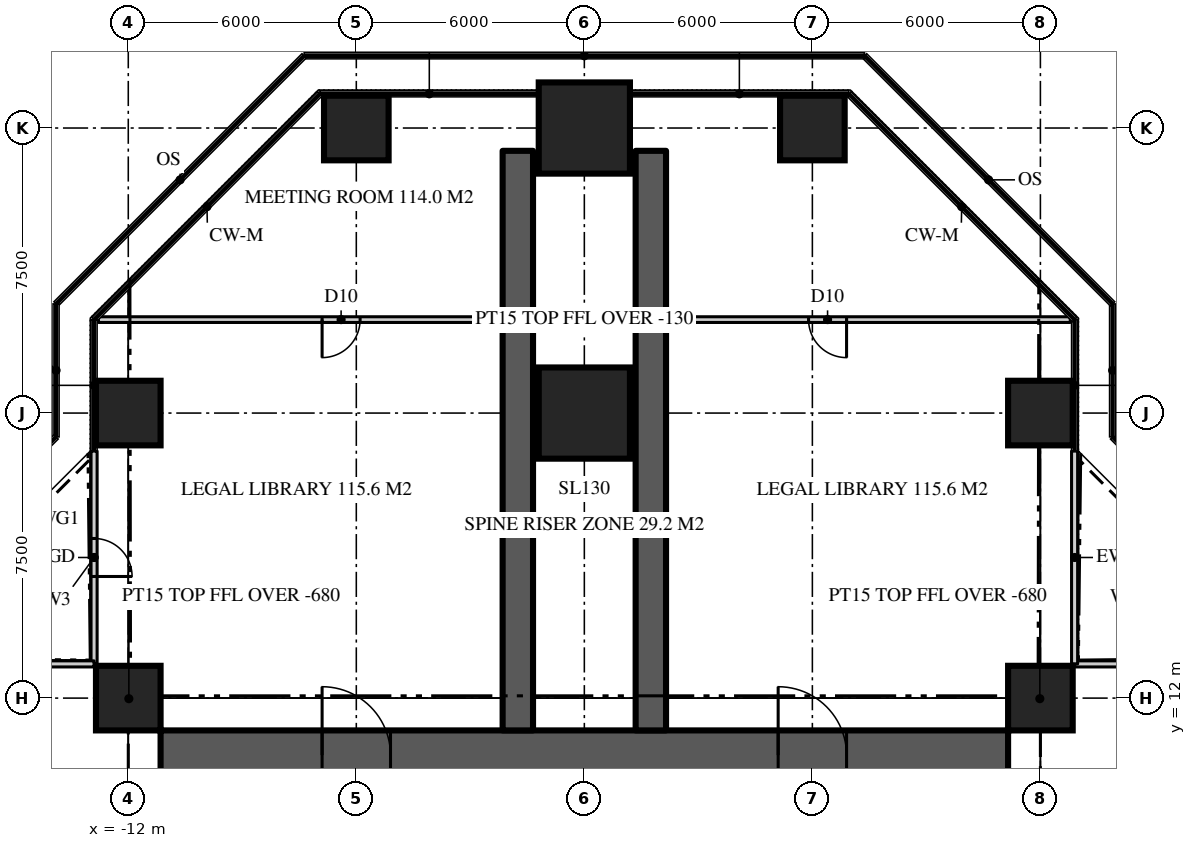
"""IFC4 building model, lengths in metres.
Left out: names, types, materials, properties, quantities, classifications, styles, units other than length and angle.
Written with IfcOpenShell. Run it as: python <this file> out.ifc"""

import sys

from ifc_helpers import new_model, si_unit, direction, frame, frame_2d, origin, origin_2d, place, context, subcontext, project, spatial, rectangle, extrude, element, fill, save


model = new_model("IFC4")
c1 = context("Model", 3, precision=1e-05, world=origin(), true_north=direction((0.0, 1.0)))
c2 = subcontext(c1, "Body", "Model", "MODEL_VIEW")
j1 = project(units=[si_unit("LENGTHUNIT", "METRE"), si_unit("PLANEANGLEUNIT", "RADIAN")], contexts=[c1])
p1 = place(None, origin())
s1 = spatial("IfcSite", under=j1, at=p1, CompositionType="ELEMENT")
p2 = place(p1, origin())
s2 = spatial("IfcBuilding", under=s1, at=p2, CompositionType="ELEMENT")
p3 = place(p2, frame((0.0, 0.0, 143.7)))
s3 = spatial("IfcBuildingStorey", under=s2, at=p3, CompositionType="ELEMENT", Elevation=143.7)
p4 = place(p3, frame((-11.15, 10.5, 0.0), z_axis=(0.0, 0.0, 1.0), x_axis=(1.0, 0.0, 0.0)))
e1 = element("IfcWall", 1, at=p4, inside=s3, PredefinedType="SHEAR", context=c2, shape_type="SweptSolid", body=[
    extrude(rectangle(XDim=22.3, YDim=1.3, at=frame_2d((11.15, 0.0))), origin(), (0.0, 0.0, 1.0), 3.9),
])
p5 = place(p4, frame((4.25, 0.0, 0.0)))
e2 = element("IfcOpeningElement", 2, at=p5, cuts=e1, PredefinedType="OPENING", context=c2, shape_type="SweptSolid", body=[
    extrude(rectangle(XDim=1.8, YDim=2.2, at=frame_2d((0.9, 1.1))), frame((0.0, 0.66, 0.0), z_axis=(0.0, -1.0, 0.0), x_axis=(1.0, 0.0, 0.0)), (0.0, 0.0, 1.0), 1.32),
])
p6 = place(p4, frame((16.25, 0.0, 0.0)))
e3 = element("IfcOpeningElement", 3, at=p6, cuts=e1, PredefinedType="OPENING", context=c2, shape_type="SweptSolid", body=[
    extrude(rectangle(XDim=1.8, YDim=2.2, at=frame_2d((0.9, 1.1))), frame((0.0, 0.66, 0.0), z_axis=(0.0, -1.0, 0.0), x_axis=(1.0, 0.0, 0.0)), (0.0, 0.0, 1.0), 1.32),
])
for number, where, z_axis, x_axis in (
    (4, (1.75, 11.15, 0.0), (0.0, 0.0, 1.0), (0.0, 1.0, 0.0)),
    (5, (-1.75, 11.15, 0.0), (0.0, 0.0, 1.0), (0.0, 1.0, 0.0)),
):
    element("IfcWall", number, at=place(p3, frame(where, z_axis=z_axis, x_axis=x_axis)), inside=s3, PredefinedType="SHEAR", context=c2, shape_type="SweptSolid", body=[
        extrude(rectangle(XDim=15.25, YDim=0.8, at=frame_2d((7.625, 0.0))), origin(), (0.0, 0.0, 1.0), 3.9),
    ])
for number, where, z_axis, x_axis in (
    (6, (-12.0, 12.0, 0.0), (0.0, 0.0, 1.0), (1.0, 0.0, 0.0)),
    (7, (12.0, 12.0, 0.0), (0.0, 0.0, 1.0), (1.0, 0.0, 0.0)),
    (8, (-12.0, 19.5, 0.0), (0.0, 0.0, 1.0), (1.0, 0.0, 0.0)),
):
    element("IfcColumn", number, at=place(p3, frame(where, z_axis=z_axis, x_axis=x_axis)), inside=s3, PredefinedType="COLUMN", context=c2, shape_type="SweptSolid", body=[
        extrude(rectangle(XDim=1.7, YDim=1.7, at=origin_2d()), origin(), (0.0, 0.0, 1.0), 3.9),
    ])
p7 = place(p3, frame((0.0, 19.5, 0.0), z_axis=(0.0, 0.0, 1.0), x_axis=(1.0, 0.0, 0.0)))
e9 = element("IfcColumn", 9, at=p7, inside=s3, PredefinedType="COLUMN", context=c2, shape_type="SweptSolid", body=[
    extrude(rectangle(XDim=2.4, YDim=2.4, at=origin_2d()), origin(), (0.0, 0.0, 1.0), 3.9),
])
for number, where, z_axis, x_axis in (
    (10, (12.0, 19.5, 0.0), (0.0, 0.0, 1.0), (1.0, 0.0, 0.0)),
    (11, (-6.0, 27.0, 0.0), (0.0, 0.0, 1.0), (1.0, 0.0, 0.0)),
):
    element("IfcColumn", number, at=place(p3, frame(where, z_axis=z_axis, x_axis=x_axis)), inside=s3, PredefinedType="COLUMN", context=c2, shape_type="SweptSolid", body=[
        extrude(rectangle(XDim=1.7, YDim=1.7, at=origin_2d()), origin(), (0.0, 0.0, 1.0), 3.9),
    ])
p8 = place(p3, frame((0.0, 27.0, 0.0), z_axis=(0.0, 0.0, 1.0), x_axis=(1.0, 0.0, 0.0)))
e12 = element("IfcColumn", 12, at=p8, inside=s3, PredefinedType="COLUMN", context=c2, shape_type="SweptSolid", body=[
    extrude(rectangle(XDim=2.4, YDim=2.4, at=origin_2d()), origin(), (0.0, 0.0, 1.0), 3.9),
])
p9 = place(p3, frame((6.0, 27.0, 0.0), z_axis=(0.0, 0.0, 1.0), x_axis=(1.0, 0.0, 0.0)))
e13 = element("IfcColumn", 13, at=p9, inside=s3, PredefinedType="COLUMN", context=c2, shape_type="SweptSolid", body=[
    extrude(rectangle(XDim=1.7, YDim=1.7, at=origin_2d()), origin(), (0.0, 0.0, 1.0), 3.9),
])
p10 = place(p3, frame((18.5, 12.9, 0.0), z_axis=(0.0, 0.0, 1.0), x_axis=(-1.0, 0.0, 0.0)))
e14 = element("IfcWall", 14, at=p10, inside=s3, PredefinedType="SOLIDWALL", context=c2, shape_type="SweptSolid", body=[
    extrude(rectangle(XDim=5.6, YDim=0.16, at=frame_2d((2.8, 0.0))), origin(), (0.0, 0.0, 1.0), 3.77),
])
p11 = place(p10, frame((2.3, 0.0, 0.0)))
e15 = element("IfcOpeningElement", 15, at=p11, cuts=e14, PredefinedType="OPENING", context=c2, shape_type="SweptSolid", body=[
    extrude(rectangle(XDim=1.0, YDim=2.2, at=frame_2d((0.5, 1.1))), frame((0.0, 0.09, 0.0), z_axis=(0.0, -1.0, 0.0), x_axis=(1.0, 0.0, 0.0)), (0.0, 0.0, 1.0), 0.18),
])
p12 = place(p3, frame((12.9, 12.9, 0.0), z_axis=(0.0, 0.0, 1.0), x_axis=(0.0, 1.0, 0.0)))
e16 = element("IfcWall", 16, at=p12, inside=s3, PredefinedType="SOLIDWALL", context=c2, shape_type="SweptSolid", body=[
    extrude(rectangle(XDim=5.6, YDim=0.16, at=frame_2d((2.8, 0.0))), origin(), (0.0, 0.0, 1.0), 3.77),
])
p13 = place(p3, frame((-12.9, 18.5, 0.0), z_axis=(0.0, 0.0, 1.0), x_axis=(0.0, -1.0, 0.0)))
e17 = element("IfcWall", 17, at=p13, inside=s3, PredefinedType="SOLIDWALL", context=c2, shape_type="SweptSolid", body=[
    extrude(rectangle(XDim=5.6, YDim=0.16, at=frame_2d((2.8, 0.0))), origin(), (0.0, 0.0, 1.0), 3.77),
])
p14 = place(p13, frame((2.3, 0.0, 0.0)))
e18 = element("IfcOpeningElement", 18, at=p14, cuts=e17, PredefinedType="OPENING", context=c2, shape_type="SweptSolid", body=[
    extrude(rectangle(XDim=1.0, YDim=2.2, at=frame_2d((0.5, 1.1))), frame((0.0, 0.09, 0.0), z_axis=(0.0, -1.0, 0.0), x_axis=(1.0, 0.0, 0.0)), (0.0, 0.0, 1.0), 0.18),
])
p15 = place(p3, frame((-12.9, 12.9, 0.0), z_axis=(0.0, 0.0, 1.0), x_axis=(-1.0, 0.0, 0.0)))
e19 = element("IfcWall", 19, at=p15, inside=s3, PredefinedType="SOLIDWALL", context=c2, shape_type="SweptSolid", body=[
    extrude(rectangle(XDim=5.6, YDim=0.16, at=frame_2d((2.8, 0.0))), origin(), (0.0, 0.0, 1.0), 3.77),
])
p16 = place(p3, frame((12.786, 21.959, 0.0), z_axis=(0.0, 0.0, 1.0), x_axis=(-1.0, 0.0, 0.0)))
e20 = element("IfcWall", 20, at=p16, inside=s3, PredefinedType="PARTITIONING", context=c2, shape_type="SweptSolid", body=[
    extrude(rectangle(XDim=25.573, YDim=0.15, at=frame_2d((12.786, 0.0))), origin(), (0.0, 0.0, 1.0), 3.77),
])
p17 = place(p16, frame((18.687, 0.0, 0.0)))
e21 = element("IfcOpeningElement", 21, at=p17, cuts=e20, PredefinedType="OPENING", context=c2, shape_type="SweptSolid", body=[
    extrude(rectangle(XDim=1.0, YDim=2.2, at=frame_2d((0.5, 1.1))), frame((0.0, 0.085, 0.0), z_axis=(0.0, -1.0, 0.0), x_axis=(1.0, 0.0, 0.0)), (0.0, 0.0, 1.0), 0.17),
])
p18 = place(p16, frame((5.886, 0.0, 0.0)))
e22 = element("IfcOpeningElement", 22, at=p18, cuts=e20, PredefinedType="OPENING", context=c2, shape_type="SweptSolid", body=[
    extrude(rectangle(XDim=1.0, YDim=2.2, at=frame_2d((0.5, 1.1))), frame((0.0, 0.085, 0.0), z_axis=(0.0, -1.0, 0.0), x_axis=(1.0, 0.0, 0.0)), (0.0, 0.0, 1.0), 0.17),
])
for number, where, z_axis, x_axis in (
    (23, (11.15, 11.15, 0.0), (0.0, 0.0, 1.0), (0.707, 0.707, 0.0)),
    (24, (-11.15, 11.15, 0.0), (0.0, 0.0, 1.0), (-0.707, 0.707, 0.0)),
):
    element("IfcWall", number, at=place(p3, frame(where, z_axis=z_axis, x_axis=x_axis)), inside=s3, PredefinedType="PARTITIONING", context=c2, shape_type="SweptSolid", body=[
        extrude(rectangle(XDim=2.362, YDim=0.15, at=frame_2d((1.181, 0.0))), origin(), (0.0, 0.0, 1.0), 3.22),
    ])
p19 = place(p14, origin())
e25 = element("IfcDoor", 25, at=p19, inside=s3, OperationType="SINGLE_SWING_RIGHT", PredefinedType="DOOR", context=c2, shape_type="SweptSolid", body=[
    extrude(rectangle(XDim=1.0, YDim=2.2, at=frame_2d((0.5, 1.1))), frame((0.0, 0.025, 0.0), z_axis=(0.0, -1.0, 0.0), x_axis=(1.0, 0.0, 0.0)), (0.0, 0.0, 1.0), 0.05),
])
fill(e18, e25)
p20 = place(p5, origin())
e26 = element("IfcDoor", 26, at=p20, inside=s3, OperationType="DOUBLE_DOOR_DOUBLE_SWING", PredefinedType="DOOR", context=c2, shape_type="SweptSolid", body=[
    extrude(rectangle(XDim=1.8, YDim=2.2, at=frame_2d((0.9, 1.1))), frame((0.0, 0.025, 0.0), z_axis=(0.0, -1.0, 0.0), x_axis=(1.0, 0.0, 0.0)), (0.0, 0.0, 1.0), 0.05),
])
fill(e2, e26)
p21 = place(p6, origin())
e27 = element("IfcDoor", 27, at=p21, inside=s3, OperationType="DOUBLE_DOOR_DOUBLE_SWING", PredefinedType="DOOR", context=c2, shape_type="SweptSolid", body=[
    extrude(rectangle(XDim=1.8, YDim=2.2, at=frame_2d((0.9, 1.1))), frame((0.0, 0.025, 0.0), z_axis=(0.0, -1.0, 0.0), x_axis=(1.0, 0.0, 0.0)), (0.0, 0.0, 1.0), 0.05),
])
fill(e3, e27)
p22 = place(p17, origin())
e28 = element("IfcDoor", 28, at=p22, inside=s3, OperationType="SINGLE_SWING_RIGHT", PredefinedType="DOOR", context=c2, shape_type="SweptSolid", body=[
    extrude(rectangle(XDim=1.0, YDim=2.2, at=frame_2d((0.5, 1.1))), frame((0.0, 0.025, 0.0), z_axis=(0.0, -1.0, 0.0), x_axis=(1.0, 0.0, 0.0)), (0.0, 0.0, 1.0), 0.05),
])
fill(e21, e28)
p23 = place(p18, origin())
e29 = element("IfcDoor", 29, at=p23, inside=s3, OperationType="SINGLE_SWING_LEFT", PredefinedType="DOOR", context=c2, shape_type="SweptSolid", body=[
    extrude(rectangle(XDim=1.0, YDim=2.2, at=frame_2d((0.5, 1.1))), frame((0.0, 0.025, 0.0), z_axis=(0.0, -1.0, 0.0), x_axis=(1.0, 0.0, 0.0)), (0.0, 0.0, 1.0), 0.05),
])
fill(e22, e29)
save(model, sys.argv[1])
